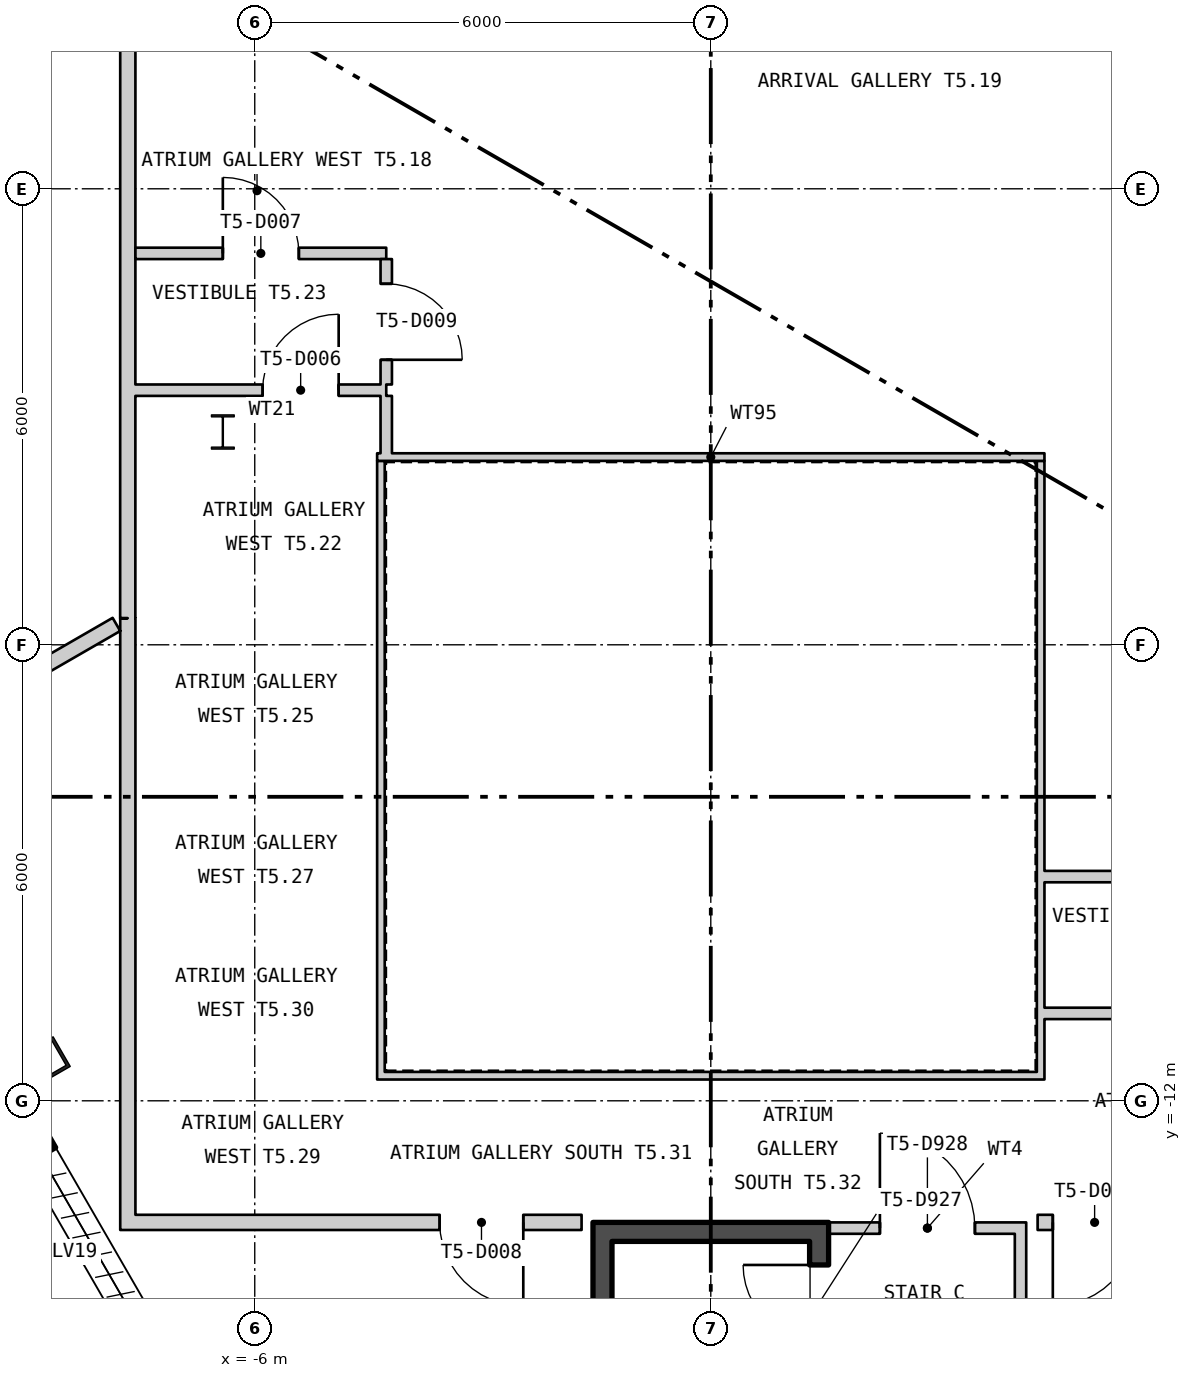
"""IFC4 building model, lengths in metres.
Left out: names, types, materials, properties, quantities, classifications, styles, units other than length and angle.
Written with IfcOpenShell. Run it as: python <this file> out.ifc"""

import sys

from ifc_helpers import new_model, si_unit, direction, frame, frame_2d, origin, origin_2d, place, context, subcontext, project, spatial, polyline, rectangle, hollow_rectangle, i_section, outline, extrude, element, fill, save


model = new_model("IFC4")
c1 = context("Model", 3, precision=1e-05, world=origin(), true_north=direction((0.0, 1.0)))
c2 = subcontext(c1, "Body", "Model", "MODEL_VIEW")
j1 = project(units=[si_unit("LENGTHUNIT", "METRE"), si_unit("PLANEANGLEUNIT", "RADIAN")], contexts=[c1])
p1 = place(None, origin())
s1 = spatial("IfcSite", under=j1, at=p1, CompositionType="ELEMENT")
p2 = place(p1, origin())
s2 = spatial("IfcBuilding", under=s1, at=p2, CompositionType="ELEMENT")
p3 = place(p2, frame((0.0, 0.0, 292.2)))
s3 = spatial("IfcBuildingStorey", under=s2, at=p3, CompositionType="ELEMENT", Elevation=292.2)
p4 = place(p3, frame((-8.843, -11.528, 0.0), z_axis=(0.0, 0.0, 1.0), x_axis=(0.5, -0.866025403784, 0.0)))
e1 = element("IfcColumn", 1, at=p4, inside=s3, PredefinedType="COLUMN", context=c2, shape_type="SweptSolid", body=[
    extrude(hollow_rectangle(XDim=0.45, YDim=0.7, WallThickness=0.04, at=origin_2d()), origin(), (0.0, 0.0, 1.0), 6.0),
])
p5 = place(p3, frame((-6.42, -3.2, 0.0), z_axis=(0.0, 0.0, 1.0), x_axis=(1.0, 0.0, 0.0)))
e2 = element("IfcColumn", 2, at=p5, inside=s3, PredefinedType="COLUMN", context=c2, shape_type="SweptSolid", body=[
    extrude(i_section(OverallWidth=0.3, OverallDepth=0.45, WebThickness=0.014, FlangeThickness=0.026, at=origin_2d()), origin(), (0.0, 0.0, 1.0), 6.0),
])
p6 = place(p3, frame((-25.28, 15.792, -0.18), z_axis=(0.0, 0.0, 1.0), x_axis=(0.500000141277, -0.866025322218, 0.0)))
e3 = element("IfcWall", 3, at=p6, inside=s3, PredefinedType="SOLIDWALL", context=c2, shape_type="SweptSolid", body=[
    extrude(outline(polyline([(-0.13, -0.225), (45.86, -0.225), (45.6, 0.225), (0.13, 0.225), (-0.13, -0.225)])), origin(), (0.0, 0.0, 1.0), 5.9),
])
p7 = place(p6, frame((1.424, 0.0, 1.38)))
e4 = element("IfcOpeningElement", 4, at=p7, cuts=e3, PredefinedType="OPENING", context=c2, shape_type="SweptSolid", body=[
    extrude(rectangle(XDim=2.4, YDim=3.6, at=frame_2d((1.2, 1.8))), frame((0.0, 0.235, 0.0), z_axis=(0.0, -1.0, 0.0), x_axis=(1.0, 0.0, 0.0)), (0.0, 0.0, 1.0), 0.47),
])
p8 = place(p6, frame((5.892, 0.0, 1.38)))
e5 = element("IfcOpeningElement", 5, at=p8, cuts=e3, PredefinedType="OPENING", context=c2, shape_type="SweptSolid", body=[
    extrude(rectangle(XDim=2.4, YDim=3.6, at=frame_2d((1.2, 1.8))), frame((0.0, 0.235, 0.0), z_axis=(0.0, -1.0, 0.0), x_axis=(1.0, 0.0, 0.0)), (0.0, 0.0, 1.0), 0.47),
])
p9 = place(p6, frame((10.399, 0.0, 1.38)))
e6 = element("IfcOpeningElement", 6, at=p9, cuts=e3, PredefinedType="OPENING", context=c2, shape_type="SweptSolid", body=[
    extrude(rectangle(XDim=2.4, YDim=3.6, at=frame_2d((1.2, 1.8))), frame((0.0, 0.235, 0.0), z_axis=(0.0, -1.0, 0.0), x_axis=(1.0, 0.0, 0.0)), (0.0, 0.0, 1.0), 0.47),
])
p10 = place(p6, frame((14.905, 0.0, 1.38)))
e7 = element("IfcOpeningElement", 7, at=p10, cuts=e3, PredefinedType="OPENING", context=c2, shape_type="SweptSolid", body=[
    extrude(rectangle(XDim=2.4, YDim=3.6, at=frame_2d((1.2, 1.8))), frame((0.0, 0.235, 0.0), z_axis=(0.0, -1.0, 0.0), x_axis=(1.0, 0.0, 0.0)), (0.0, 0.0, 1.0), 0.47),
])
p11 = place(p6, frame((19.412, 0.0, 1.38)))
e8 = element("IfcOpeningElement", 8, at=p11, cuts=e3, PredefinedType="OPENING", context=c2, shape_type="SweptSolid", body=[
    extrude(rectangle(XDim=2.4, YDim=3.6, at=frame_2d((1.2, 1.8))), frame((0.0, 0.235, 0.0), z_axis=(0.0, -1.0, 0.0), x_axis=(1.0, 0.0, 0.0)), (0.0, 0.0, 1.0), 0.47),
])
p12 = place(p6, frame((23.918, 0.0, 1.38)))
e9 = element("IfcOpeningElement", 9, at=p12, cuts=e3, PredefinedType="OPENING", context=c2, shape_type="SweptSolid", body=[
    extrude(rectangle(XDim=2.4, YDim=3.6, at=frame_2d((1.2, 1.8))), frame((0.0, 0.235, 0.0), z_axis=(0.0, -1.0, 0.0), x_axis=(1.0, 0.0, 0.0)), (0.0, 0.0, 1.0), 0.47),
])
p13 = place(p6, frame((28.425, 0.0, 1.38)))
e10 = element("IfcOpeningElement", 10, at=p13, cuts=e3, PredefinedType="OPENING", context=c2, shape_type="SweptSolid", body=[
    extrude(rectangle(XDim=2.4, YDim=3.6, at=frame_2d((1.2, 1.8))), frame((0.0, 0.235, 0.0), z_axis=(0.0, -1.0, 0.0), x_axis=(1.0, 0.0, 0.0)), (0.0, 0.0, 1.0), 0.47),
])
p14 = place(p6, frame((32.932, 0.0, 1.38)))
e11 = element("IfcOpeningElement", 11, at=p14, cuts=e3, PredefinedType="OPENING", context=c2, shape_type="SweptSolid", body=[
    extrude(rectangle(XDim=2.4, YDim=3.6, at=frame_2d((1.2, 1.8))), frame((0.0, 0.235, 0.0), z_axis=(0.0, -1.0, 0.0), x_axis=(1.0, 0.0, 0.0)), (0.0, 0.0, 1.0), 0.47),
])
p15 = place(p6, frame((37.438, 0.0, 1.38)))
e12 = element("IfcOpeningElement", 12, at=p15, cuts=e3, PredefinedType="OPENING", context=c2, shape_type="SweptSolid", body=[
    extrude(rectangle(XDim=2.4, YDim=3.6, at=frame_2d((1.2, 1.8))), frame((0.0, 0.235, 0.0), z_axis=(0.0, -1.0, 0.0), x_axis=(1.0, 0.0, 0.0)), (0.0, 0.0, 1.0), 0.47),
])
p16 = place(p6, frame((41.907, 0.0, 1.38)))
e13 = element("IfcOpeningElement", 13, at=p16, cuts=e3, PredefinedType="OPENING", context=c2, shape_type="SweptSolid", body=[
    extrude(rectangle(XDim=2.4, YDim=3.6, at=frame_2d((1.2, 1.8))), frame((0.0, 0.235, 0.0), z_axis=(0.0, -1.0, 0.0), x_axis=(1.0, 0.0, 0.0)), (0.0, 0.0, 1.0), 0.47),
])
p17 = place(p3, frame((2.415, -23.812, -0.18), z_axis=(0.0, 0.0, 1.0), x_axis=(0.499998326906, 0.866026369744, 0.0)))
e14 = element("IfcWall", 14, at=p17, inside=s3, PredefinedType="SOLIDWALL", context=c2, shape_type="SweptSolid", body=[
    extrude(outline(polyline([(-0.13, -0.225), (17.959, -0.225), (17.959, 0.225), (0.13, 0.225), (-0.13, -0.225)])), origin(), (0.0, 0.0, 1.0), 5.9),
])
p18 = place(p17, frame((1.424, 0.0, 1.38)))
e15 = element("IfcOpeningElement", 15, at=p18, cuts=e14, PredefinedType="OPENING", context=c2, shape_type="SweptSolid", body=[
    extrude(rectangle(XDim=2.4, YDim=3.6, at=frame_2d((1.2, 1.8))), frame((0.0, 0.235, 0.0), z_axis=(0.0, -1.0, 0.0), x_axis=(1.0, 0.0, 0.0)), (0.0, 0.0, 1.0), 0.47),
])
p19 = place(p17, frame((5.892, 0.0, 1.38)))
e16 = element("IfcOpeningElement", 16, at=p19, cuts=e14, PredefinedType="OPENING", context=c2, shape_type="SweptSolid", body=[
    extrude(rectangle(XDim=2.4, YDim=3.6, at=frame_2d((1.2, 1.8))), frame((0.0, 0.235, 0.0), z_axis=(0.0, -1.0, 0.0), x_axis=(1.0, 0.0, 0.0)), (0.0, 0.0, 1.0), 0.47),
])
p20 = place(p17, frame((10.399, 0.0, 1.38)))
e17 = element("IfcOpeningElement", 17, at=p20, cuts=e14, PredefinedType="OPENING", context=c2, shape_type="SweptSolid", body=[
    extrude(rectangle(XDim=2.4, YDim=3.6, at=frame_2d((1.2, 1.8))), frame((0.0, 0.235, 0.0), z_axis=(0.0, -1.0, 0.0), x_axis=(1.0, 0.0, 0.0)), (0.0, 0.0, 1.0), 0.47),
])
p21 = place(p17, frame((14.905, 0.0, 1.38)))
e18 = element("IfcOpeningElement", 18, at=p21, cuts=e14, PredefinedType="OPENING", context=c2, shape_type="SweptSolid", body=[
    extrude(rectangle(XDim=2.4, YDim=3.6, at=frame_2d((1.2, 1.8))), frame((0.0, 0.235, 0.0), z_axis=(0.0, -1.0, 0.0), x_axis=(1.0, 0.0, 0.0)), (0.0, 0.0, 1.0), 0.47),
])
p22 = place(p3, frame((-4.39, -11.67, 0.0), z_axis=(0.0, 0.0, 1.0), x_axis=(1.0, 0.0, 0.0)))
e19 = element("IfcWall", 19, at=p22, inside=s3, PredefinedType="PARTITIONING", context=c2, shape_type="SweptSolid", body=[
    extrude(rectangle(XDim=8.78, YDim=0.1, at=frame_2d((4.39, 0.0))), origin(), (0.0, 0.0, 1.0), 5.7),
])
p23 = place(p3, frame((4.34, -11.62, 0.0), z_axis=(0.0, 0.0, 1.0), x_axis=(0.0, 1.0, 0.0)))
e20 = element("IfcWall", 20, at=p23, inside=s3, PredefinedType="PARTITIONING", context=c2, shape_type="SweptSolid", body=[
    extrude(rectangle(XDim=8.04, YDim=0.1, at=frame_2d((4.02, 0.0))), origin(), (0.0, 0.0, 1.0), 5.7),
])
p24 = place(p3, frame((4.39, -3.53, 0.0), z_axis=(0.0, 0.0, 1.0), x_axis=(-1.0, 0.0, 0.0)))
e21 = element("IfcWall", 21, at=p24, inside=s3, PredefinedType="PARTITIONING", context=c2, shape_type="SweptSolid", body=[
    extrude(rectangle(XDim=8.78, YDim=0.1, at=frame_2d((4.39, 0.0))), origin(), (0.0, 0.0, 1.0), 5.7),
])
p25 = place(p3, frame((-4.34, -3.58, 0.0), z_axis=(0.0, 0.0, 1.0), x_axis=(0.0, -1.0, 0.0)))
e22 = element("IfcWall", 22, at=p25, inside=s3, PredefinedType="PARTITIONING", context=c2, shape_type="SweptSolid", body=[
    extrude(rectangle(XDim=8.04, YDim=0.1, at=frame_2d((4.02, 0.0))), origin(), (0.0, 0.0, 1.0), 5.7),
])
p26 = place(p3, frame((-1.425, -21.05, 0.0), z_axis=(0.0, 0.0, 1.0), x_axis=(0.0, 1.0, 0.0)))
e23 = element("IfcWall", 23, at=p26, inside=s3, PredefinedType="SHEAR", context=c2, shape_type="SweptSolid", body=[
    extrude(rectangle(XDim=7.2, YDim=0.25, at=frame_2d((3.6, 0.0))), origin(), (0.0, 0.0, 1.0), 5.7),
])
p27 = place(p3, frame((1.425, -21.05, 0.0), z_axis=(0.0, 0.0, 1.0), x_axis=(0.0, 1.0, 0.0)))
e24 = element("IfcWall", 24, at=p27, inside=s3, PredefinedType="SHEAR", context=c2, shape_type="SweptSolid", body=[
    extrude(rectangle(XDim=7.2, YDim=0.25, at=frame_2d((3.6, 0.0))), origin(), (0.0, 0.0, 1.0), 5.7),
])
p28 = place(p27, frame((5.89, 0.0, 0.0)))
e25 = element("IfcOpeningElement", 25, at=p28, cuts=e24, PredefinedType="OPENING", context=c2, shape_type="SweptSolid", body=[
    extrude(rectangle(XDim=1.0, YDim=2.1, at=frame_2d((0.5, 1.05))), frame((0.0, 0.135, 0.0), z_axis=(0.0, -1.0, 0.0), x_axis=(1.0, 0.0, 0.0)), (0.0, 0.0, 1.0), 0.27),
])
p29 = place(p3, frame((-1.55, -13.725, 0.0), z_axis=(0.0, 0.0, 1.0), x_axis=(1.0, 0.0, 0.0)))
e26 = element("IfcWall", 26, at=p29, inside=s3, PredefinedType="SHEAR", context=c2, shape_type="SweptSolid", body=[
    extrude(rectangle(XDim=3.1, YDim=0.25, at=frame_2d((1.55, 0.0))), origin(), (0.0, 0.0, 1.0), 5.7),
])
p30 = place(p3, frame((4.075, -16.15, 0.0), z_axis=(0.0, 0.0, 1.0), x_axis=(0.0, 1.0, 0.0)))
e27 = element("IfcWall", 27, at=p30, inside=s3, PredefinedType="PARTITIONING", context=c2, shape_type="SweptSolid", body=[
    extrude(rectangle(XDim=2.4, YDim=0.15, at=frame_2d((1.2, 0.0))), origin(), (0.0, 0.0, 1.0), 5.7),
])
p31 = place(p3, frame((1.55, -13.675, 0.0), z_axis=(0.0, 0.0, 1.0), x_axis=(1.0, 0.0, 0.0)))
e28 = element("IfcWall", 28, at=p31, inside=s3, PredefinedType="PARTITIONING", context=c2, shape_type="SweptSolid", body=[
    extrude(rectangle(XDim=2.6, YDim=0.15, at=frame_2d((1.3, 0.0))), origin(), (0.0, 0.0, 1.0), 4.79),
])
p32 = place(p31, frame((0.675, 0.0, 0.0)))
e29 = element("IfcOpeningElement", 29, at=p32, cuts=e28, PredefinedType="OPENING", context=c2, shape_type="SweptSolid", body=[
    extrude(rectangle(XDim=1.25, YDim=2.1, at=frame_2d((0.625, 1.05))), frame((0.0, 0.085, 0.0), z_axis=(0.0, -1.0, 0.0), x_axis=(1.0, 0.0, 0.0)), (0.0, 0.0, 1.0), 0.17),
])
p33 = place(p3, frame((-11.01, -7.574, 0.0), z_axis=(0.0, 0.0, 1.0), x_axis=(0.865995704065, 0.500051437896, 0.0)))
e30 = element("IfcWall", 30, at=p33, inside=s3, PredefinedType="PARTITIONING", context=c2, shape_type="SweptSolid", body=[
    extrude(rectangle(XDim=3.684, YDim=0.2, at=frame_2d((1.842, 0.0))), origin(), (0.0, 0.0, 1.0), 5.7),
])
p34 = place(p3, frame((-7.671, -5.65, 0.0), z_axis=(0.0, 0.0, 1.0), x_axis=(0.000129032257, 0.999999991675, 0.0)))
e31 = element("IfcWall", 31, at=p34, inside=s3, PredefinedType="PARTITIONING", context=c2, shape_type="SweptSolid", body=[
    extrude(rectangle(XDim=7.75, YDim=0.2, at=frame_2d((3.875, 0.0))), origin(), (0.0, 0.0, 1.0), 5.7),
])
p35 = place(p3, frame((-7.67, -13.7, 0.0), z_axis=(0.0, 0.0, 1.0), x_axis=(0.0, 1.0, 0.0)))
e32 = element("IfcWall", 32, at=p35, inside=s3, PredefinedType="PARTITIONING", context=c2, shape_type="SweptSolid", body=[
    extrude(rectangle(XDim=8.05, YDim=0.2, at=frame_2d((4.025, 0.0))), origin(), (0.0, 0.0, 1.0), 5.7),
])
p36 = place(p3, frame((-7.571, -2.65, 0.0), z_axis=(0.0, 0.0, 1.0), x_axis=(1.0, 0.0, 0.0)))
e33 = element("IfcWall", 33, at=p36, inside=s3, PredefinedType="PARTITIONING", context=c2, shape_type="SweptSolid", body=[
    extrude(rectangle(XDim=3.301, YDim=0.15, at=frame_2d((1.651, 0.0))), origin(), (0.0, 0.0, 1.0), 5.7),
])
p37 = place(p36, frame((1.675, 0.0, 0.0)))
e34 = element("IfcOpeningElement", 34, at=p37, cuts=e33, PredefinedType="OPENING", context=c2, shape_type="SweptSolid", body=[
    extrude(rectangle(XDim=1.0, YDim=2.1, at=frame_2d((0.5, 1.05))), frame((0.0, 0.085, 0.0), z_axis=(0.0, -1.0, 0.0), x_axis=(1.0, 0.0, 0.0)), (0.0, 0.0, 1.0), 0.17),
])
p38 = place(p3, frame((-7.57, -0.85, 0.0), z_axis=(0.0, 0.0, 1.0), x_axis=(1.0, 0.0, 0.0)))
e35 = element("IfcWall", 35, at=p38, inside=s3, PredefinedType="PARTITIONING", context=c2, shape_type="SweptSolid", body=[
    extrude(rectangle(XDim=3.3, YDim=0.15, at=frame_2d((1.65, 0.0))), origin(), (0.0, 0.0, 1.0), 5.7),
])
p39 = place(p38, frame((1.15, 0.0, 0.0)))
e36 = element("IfcOpeningElement", 36, at=p39, cuts=e35, PredefinedType="OPENING", context=c2, shape_type="SweptSolid", body=[
    extrude(rectangle(XDim=1.0, YDim=2.1, at=frame_2d((0.5, 1.05))), frame((0.0, 0.085, 0.0), z_axis=(0.0, -1.0, 0.0), x_axis=(1.0, 0.0, 0.0)), (0.0, 0.0, 1.0), 0.17),
])
p40 = place(p3, frame((-7.57, -13.6, 0.0), z_axis=(0.0, 0.0, 1.0), x_axis=(1.0, 0.0, 0.0)))
e37 = element("IfcWall", 37, at=p40, inside=s3, PredefinedType="PARTITIONING", context=c2, shape_type="SweptSolid", body=[
    extrude(rectangle(XDim=5.87, YDim=0.2, at=frame_2d((2.935, 0.0))), origin(), (0.0, 0.0, 1.0), 4.79),
])
p41 = place(p40, frame((4.003, 0.0, 0.0)))
e38 = element("IfcOpeningElement", 38, at=p41, cuts=e37, PredefinedType="OPENING", context=c2, shape_type="SweptSolid", body=[
    extrude(rectangle(XDim=1.1, YDim=2.1, at=frame_2d((0.55, 1.05))), frame((0.0, 0.11, 0.0), z_axis=(0.0, -1.0, 0.0), x_axis=(1.0, 0.0, 0.0)), (0.0, 0.0, 1.0), 0.22),
])
p42 = place(p3, frame((-4.27, -3.48, 0.0), z_axis=(0.0, 0.0, 1.0), x_axis=(0.0, 1.0, 0.0)))
e39 = element("IfcWall", 39, at=p42, inside=s3, PredefinedType="PARTITIONING", context=c2, shape_type="SweptSolid", body=[
    extrude(rectangle(XDim=0.755, YDim=0.15, at=frame_2d((0.378, 0.0))), origin(), (0.0, 0.0, 1.0), 5.7),
])
p43 = place(p3, frame((-4.27, -2.575, 0.0), z_axis=(0.0, 0.0, 1.0), x_axis=(0.0, 1.0, 0.0)))
e40 = element("IfcWall", 40, at=p43, inside=s3, PredefinedType="PARTITIONING", context=c2, shape_type="SweptSolid", body=[
    extrude(rectangle(XDim=1.65, YDim=0.15, at=frame_2d((0.825, 0.0))), origin(), (0.0, 0.0, 1.0), 5.7),
])
p44 = place(p43, frame((0.325, 0.0, 0.0)))
e41 = element("IfcOpeningElement", 41, at=p44, cuts=e40, PredefinedType="OPENING", context=c2, shape_type="SweptSolid", body=[
    extrude(rectangle(XDim=1.0, YDim=2.1, at=frame_2d((0.5, 1.05))), frame((0.0, 0.085, 0.0), z_axis=(0.0, -1.0, 0.0), x_axis=(1.0, 0.0, 0.0)), (0.0, 0.0, 1.0), 0.17),
])
p45 = place(p3, frame((4.3, -13.6, 0.0), z_axis=(0.0, 0.0, 1.0), x_axis=(1.0, 0.0, 0.0)))
e42 = element("IfcWall", 42, at=p45, inside=s3, PredefinedType="PARTITIONING", context=c2, shape_type="SweptSolid", body=[
    extrude(rectangle(XDim=3.27, YDim=0.2, at=frame_2d((1.635, 0.0))), origin(), (0.0, 0.0, 1.0), 4.79),
])
p46 = place(p45, frame((0.2, 0.0, 0.0)))
e43 = element("IfcOpeningElement", 43, at=p46, cuts=e42, PredefinedType="OPENING", context=c2, shape_type="SweptSolid", body=[
    extrude(rectangle(XDim=1.1, YDim=2.1, at=frame_2d((0.55, 1.05))), frame((0.0, 0.11, 0.0), z_axis=(0.0, -1.0, 0.0), x_axis=(1.0, 0.0, 0.0)), (0.0, 0.0, 1.0), 0.22),
])
p47 = place(p3, frame((4.39, -10.85, 0.0), z_axis=(0.0, 0.0, 1.0), x_axis=(1.0, 0.0, 0.0)))
e44 = element("IfcWall", 44, at=p47, inside=s3, PredefinedType="PARTITIONING", context=c2, shape_type="SweptSolid", body=[
    extrude(rectangle(XDim=3.18, YDim=0.15, at=frame_2d((1.59, 0.0))), origin(), (0.0, 0.0, 1.0), 5.7),
])
p48 = place(p47, frame((1.09, 0.0, 0.0)))
e45 = element("IfcOpeningElement", 45, at=p48, cuts=e44, PredefinedType="OPENING", context=c2, shape_type="SweptSolid", body=[
    extrude(rectangle(XDim=1.0, YDim=2.1, at=frame_2d((0.5, 1.05))), frame((0.0, 0.085, 0.0), z_axis=(0.0, -1.0, 0.0), x_axis=(1.0, 0.0, 0.0)), (0.0, 0.0, 1.0), 0.17),
])
p49 = place(p3, frame((4.39, -9.05, 0.0), z_axis=(0.0, 0.0, 1.0), x_axis=(1.0, 0.0, 0.0)))
e46 = element("IfcWall", 46, at=p49, inside=s3, PredefinedType="PARTITIONING", context=c2, shape_type="SweptSolid", body=[
    extrude(rectangle(XDim=3.18, YDim=0.15, at=frame_2d((1.59, 0.0))), origin(), (0.0, 0.0, 1.0), 5.7),
])
p50 = place(p49, frame((1.09, 0.0, 0.0)))
e47 = element("IfcOpeningElement", 47, at=p50, cuts=e46, PredefinedType="OPENING", context=c2, shape_type="SweptSolid", body=[
    extrude(rectangle(XDim=1.0, YDim=2.1, at=frame_2d((0.5, 1.05))), frame((0.0, 0.085, 0.0), z_axis=(0.0, -1.0, 0.0), x_axis=(1.0, 0.0, 0.0)), (0.0, 0.0, 1.0), 0.17),
])
p51 = place(p28, origin())
e48 = element("IfcDoor", 48, at=p51, inside=s3, OperationType="SINGLE_SWING_LEFT", PredefinedType="DOOR", context=c2, shape_type="SweptSolid", body=[
    extrude(rectangle(XDim=1.0, YDim=2.1, at=frame_2d((0.5, 1.05))), frame((0.0, 0.025, 0.0), z_axis=(0.0, -1.0, 0.0), x_axis=(1.0, 0.0, 0.0)), (0.0, 0.0, 1.0), 0.05),
])
fill(e25, e48)
p52 = place(p32, origin())
e49 = element("IfcDoor", 49, at=p52, inside=s3, OperationType="SINGLE_SWING_RIGHT", PredefinedType="DOOR", context=c2, shape_type="SweptSolid", body=[
    extrude(rectangle(XDim=1.25, YDim=2.1, at=frame_2d((0.625, 1.05))), frame((0.0, 0.025, 0.0), z_axis=(0.0, -1.0, 0.0), x_axis=(1.0, 0.0, 0.0)), (0.0, 0.0, 1.0), 0.05),
])
fill(e29, e49)
p53 = place(p37, origin())
e50 = element("IfcDoor", 50, at=p53, inside=s3, OperationType="SINGLE_SWING_LEFT", PredefinedType="DOOR", context=c2, shape_type="SweptSolid", body=[
    extrude(rectangle(XDim=1.0, YDim=2.1, at=frame_2d((0.5, 1.05))), frame((0.0, 0.025, 0.0), z_axis=(0.0, -1.0, 0.0), x_axis=(1.0, 0.0, 0.0)), (0.0, 0.0, 1.0), 0.05),
])
fill(e34, e50)
p54 = place(p39, origin())
e51 = element("IfcDoor", 51, at=p54, inside=s3, OperationType="SINGLE_SWING_RIGHT", PredefinedType="DOOR", context=c2, shape_type="SweptSolid", body=[
    extrude(rectangle(XDim=1.0, YDim=2.1, at=frame_2d((0.5, 1.05))), frame((0.0, 0.025, 0.0), z_axis=(0.0, -1.0, 0.0), x_axis=(1.0, 0.0, 0.0)), (0.0, 0.0, 1.0), 0.05),
])
fill(e36, e51)
p55 = place(p41, origin())
e52 = element("IfcDoor", 52, at=p55, inside=s3, OperationType="SINGLE_SWING_RIGHT", PredefinedType="DOOR", context=c2, shape_type="SweptSolid", body=[
    extrude(rectangle(XDim=1.1, YDim=2.1, at=frame_2d((0.55, 1.05))), frame((0.0, 0.025, 0.0), z_axis=(0.0, -1.0, 0.0), x_axis=(1.0, 0.0, 0.0)), (0.0, 0.0, 1.0), 0.05),
])
fill(e38, e52)
p56 = place(p44, origin())
e53 = element("IfcDoor", 53, at=p56, inside=s3, OperationType="SINGLE_SWING_LEFT", PredefinedType="DOOR", context=c2, shape_type="SweptSolid", body=[
    extrude(rectangle(XDim=1.0, YDim=2.1, at=frame_2d((0.5, 1.05))), frame((0.0, 0.025, 0.0), z_axis=(0.0, -1.0, 0.0), x_axis=(1.0, 0.0, 0.0)), (0.0, 0.0, 1.0), 0.05),
])
fill(e41, e53)
p57 = place(p46, origin())
e54 = element("IfcDoor", 54, at=p57, inside=s3, OperationType="SINGLE_SWING_LEFT", PredefinedType="DOOR", context=c2, shape_type="SweptSolid", body=[
    extrude(rectangle(XDim=1.1, YDim=2.1, at=frame_2d((0.55, 1.05))), frame((0.0, 0.025, 0.0), z_axis=(0.0, -1.0, 0.0), x_axis=(1.0, 0.0, 0.0)), (0.0, 0.0, 1.0), 0.05),
])
fill(e43, e54)
save(model, sys.argv[1])
